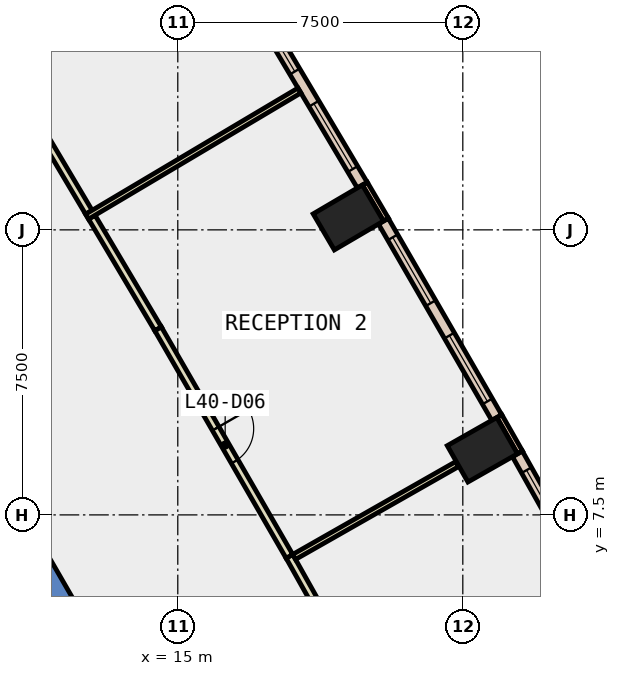
"""IFC4 building model, lengths in metres.
Left out: names, types, materials, properties, quantities, classifications, styles, units other than length and angle.
Written with IfcOpenShell. Run it as: python <this file> out.ifc"""

import sys

from ifc_helpers import new_model, si_unit, direction, frame, frame_2d, origin, origin_2d, place, context, subcontext, project, spatial, polyline, rectangle, outline, extrude, element, fill, save


model = new_model("IFC4")
c1 = context("Model", 3, precision=1e-05, world=origin(), true_north=direction((0.0, 1.0)))
c2 = subcontext(c1, "Body", "Model", "MODEL_VIEW")
j1 = project(units=[si_unit("LENGTHUNIT", "METRE"), si_unit("PLANEANGLEUNIT", "RADIAN")], contexts=[c1])
p1 = place(None, origin())
s1 = spatial("IfcSite", under=j1, at=p1, CompositionType="ELEMENT")
p2 = place(p1, origin())
s2 = spatial("IfcBuilding", under=s1, at=p2, CompositionType="ELEMENT")
p3 = place(p2, frame((0.0, 0.0, 180.2)))
s3 = spatial("IfcBuildingStorey", under=s2, at=p3, CompositionType="ELEMENT", Elevation=180.2)
for number, where, z_axis, x_axis in (
    (1, (23.015, 9.214, -0.4), (0.0, 0.0, 1.0), (-0.494, 0.869, 0.0)),
    (2, (19.488, 15.326, -0.4), (0.0, 0.0, 1.0), (-0.506, 0.863, 0.0)),
):
    element("IfcColumn", number, at=place(p3, frame(where, z_axis=z_axis, x_axis=x_axis)), inside=s3, PredefinedType="COLUMN", context=c2, shape_type="SweptSolid", body=[
        extrude(rectangle(XDim=1.1, YDim=1.5, at=origin_2d()), origin(), (0.0, 0.0, 1.0), 4.0),
    ])
p4 = place(p3, frame((0.0, 0.0, -0.4)))
e3 = element("IfcWall", 3, at=p4, inside=s3, PredefinedType="SHEAR", context=c2, shape_type="SweptSolid", body=[
    extrude(outline(polyline([(8.517, 11.748), (7.651, 11.248), (12.702, 2.5), (13.856, 2.5), (8.517, 11.748)])), origin(), (0.0, 0.0, 1.0), 4.0),
])
p5 = place(p3, frame((24.005, 9.144, 0.0), z_axis=(0.0, 0.0, 1.0), x_axis=(-0.494512685492, 0.869170411305, 0.0)))
e4 = element("IfcWall", 4, at=p5, inside=s3, PredefinedType="STANDARD", context=c2, shape_type="SweptSolid", body=[
    extrude(rectangle(XDim=1.1, YDim=0.15, at=frame_2d((0.55, 0.0))), origin(), (0.0, 0.0, 1.0), 3.6),
])
p6 = place(p3, frame((20.478, 15.269, 0.0), z_axis=(0.0, 0.0, 1.0), x_axis=(-0.50667077411, 0.862139621327, 0.0)))
e5 = element("IfcWall", 5, at=p6, inside=s3, PredefinedType="STANDARD", context=c2, shape_type="SweptSolid", body=[
    extrude(rectangle(XDim=1.1, YDim=0.15, at=frame_2d((0.55, 0.0))), origin(), (0.0, 0.0, 1.0), 3.6),
])
p7 = place(p3, frame((26.857, 3.9, 0.0), z_axis=(0.0, 0.0, 1.0), x_axis=(-0.489305602904, 0.872112393541, 0.0)))
e6 = element("IfcWall", 6, at=p7, inside=s3, PredefinedType="STANDARD", context=c2, shape_type="SweptSolid", body=[
    extrude(rectangle(XDim=5.969, YDim=0.3, at=frame_2d((2.985, 0.0))), origin(), (0.0, 0.0, 1.0), 3.6),
])
p8 = place(p7, frame((0.492, 0.0, 0.9)))
e7 = element("IfcOpeningElement", 7, at=p8, cuts=e6, PredefinedType="OPENING", context=c2, shape_type="SweptSolid", body=[
    extrude(rectangle(XDim=2.0, YDim=2.6, at=frame_2d((1.0, 1.3))), frame((0.0, 0.16, 0.0), z_axis=(0.0, -1.0, 0.0), x_axis=(1.0, 0.0, 0.0)), (0.0, 0.0, 1.0), 0.32),
])
p9 = place(p7, frame((3.477, 0.0, 0.9)))
e8 = element("IfcOpeningElement", 8, at=p9, cuts=e6, PredefinedType="OPENING", context=c2, shape_type="SweptSolid", body=[
    extrude(rectangle(XDim=2.0, YDim=2.6, at=frame_2d((1.0, 1.3))), frame((0.0, 0.16, 0.0), z_axis=(0.0, -1.0, 0.0), x_axis=(1.0, 0.0, 0.0)), (0.0, 0.0, 1.0), 0.32),
])
p10 = place(p3, frame((23.393, 10.06, 0.0), z_axis=(0.0, 0.0, 1.0), x_axis=(-0.499908916093, 0.866077984716, 0.0)))
e9 = element("IfcWall", 9, at=p10, inside=s3, PredefinedType="STANDARD", context=c2, shape_type="SweptSolid", body=[
    extrude(rectangle(XDim=5.969, YDim=0.3, at=frame_2d((2.985, 0.0))), origin(), (0.0, 0.0, 1.0), 3.6),
])
p11 = place(p10, frame((0.492, 0.0, 0.9)))
e10 = element("IfcOpeningElement", 10, at=p11, cuts=e9, PredefinedType="OPENING", context=c2, shape_type="SweptSolid", body=[
    extrude(rectangle(XDim=2.0, YDim=2.6, at=frame_2d((1.0, 1.3))), frame((0.0, 0.16, 0.0), z_axis=(0.0, -1.0, 0.0), x_axis=(1.0, 0.0, 0.0)), (0.0, 0.0, 1.0), 0.32),
])
p12 = place(p10, frame((3.477, 0.0, 0.9)))
e11 = element("IfcOpeningElement", 11, at=p12, cuts=e9, PredefinedType="OPENING", context=c2, shape_type="SweptSolid", body=[
    extrude(rectangle(XDim=2.0, YDim=2.6, at=frame_2d((1.0, 1.3))), frame((0.0, 0.16, 0.0), z_axis=(0.0, -1.0, 0.0), x_axis=(1.0, 0.0, 0.0)), (0.0, 0.0, 1.0), 0.32),
])
p13 = place(p3, frame((19.854, 16.177, 0.0), z_axis=(0.0, 0.0, 1.0), x_axis=(-0.510653096173, 0.859786842984, 0.0)))
e12 = element("IfcWall", 12, at=p13, inside=s3, PredefinedType="STANDARD", context=c2, shape_type="SweptSolid", body=[
    extrude(rectangle(XDim=5.969, YDim=0.3, at=frame_2d((2.984, 0.0))), origin(), (0.0, 0.0, 1.0), 3.6),
])
p14 = place(p13, frame((0.492, 0.0, 0.9)))
e13 = element("IfcOpeningElement", 13, at=p14, cuts=e12, PredefinedType="OPENING", context=c2, shape_type="SweptSolid", body=[
    extrude(rectangle(XDim=2.0, YDim=2.6, at=frame_2d((1.0, 1.3))), frame((0.0, 0.16, 0.0), z_axis=(0.0, -1.0, 0.0), x_axis=(1.0, 0.0, 0.0)), (0.0, 0.0, 1.0), 0.32),
])
p15 = place(p13, frame((3.477, 0.0, 0.9)))
e14 = element("IfcOpeningElement", 14, at=p15, cuts=e12, PredefinedType="OPENING", context=c2, shape_type="SweptSolid", body=[
    extrude(rectangle(XDim=2.0, YDim=2.6, at=frame_2d((1.0, 1.3))), frame((0.0, 0.16, 0.0), z_axis=(0.0, -1.0, 0.0), x_axis=(1.0, 0.0, 0.0)), (0.0, 0.0, 1.0), 0.32),
])
p16 = place(p3, frame((17.938, 6.411, 0.0), z_axis=(0.0, 0.0, 1.0), x_axis=(0.48930419744, -0.872113182086, 0.0)))
e15 = element("IfcWall", 15, at=p16, inside=s3, PredefinedType="PARTITIONING", context=c2, shape_type="SweptSolid", body=[
    extrude(rectangle(XDim=7.063, YDim=0.2, at=frame_2d((3.532, 0.0))), origin(), (0.0, 0.0, 1.0), 3.6),
])
p17 = place(p16, frame((3.032, 0.0, 0.0)))
e16 = element("IfcOpeningElement", 16, at=p17, cuts=e15, PredefinedType="OPENING", context=c2, shape_type="SweptSolid", body=[
    extrude(rectangle(XDim=1.0, YDim=2.1, at=frame_2d((0.5, 1.05))), frame((0.0, 0.11, 0.0), z_axis=(0.0, -1.0, 0.0), x_axis=(1.0, 0.0, 0.0)), (0.0, 0.0, 1.0), 0.22),
])
p18 = place(p3, frame((12.737, 15.334, 0.0), z_axis=(0.0, 0.0, 1.0), x_axis=(0.51050904729, -0.859872381598, 0.0)))
e17 = element("IfcWall", 17, at=p18, inside=s3, PredefinedType="PARTITIONING", context=c2, shape_type="SweptSolid", body=[
    extrude(rectangle(XDim=3.418, YDim=0.2, at=frame_2d((1.709, 0.0))), origin(), (0.0, 0.0, 1.0), 3.6),
])
p19 = place(p3, frame((14.482, 12.395, 0.0), z_axis=(0.0, 0.0, 1.0), x_axis=(0.499953847993, -0.866052048018, 0.0)))
e18 = element("IfcWall", 18, at=p19, inside=s3, PredefinedType="PARTITIONING", context=c2, shape_type="SweptSolid", body=[
    extrude(rectangle(XDim=6.911, YDim=0.2, at=frame_2d((3.456, 0.0))), origin(), (0.0, 0.0, 1.0), 3.6),
])
p20 = place(p19, frame((3.03, 0.0, 0.0)))
e19 = element("IfcOpeningElement", 19, at=p20, cuts=e18, PredefinedType="OPENING", context=c2, shape_type="SweptSolid", body=[
    extrude(rectangle(XDim=1.0, YDim=2.1, at=frame_2d((0.5, 1.05))), frame((0.0, 0.11, 0.0), z_axis=(0.0, -1.0, 0.0), x_axis=(1.0, 0.0, 0.0)), (0.0, 0.0, 1.0), 0.22),
])
p21 = place(p3, frame((10.915, 18.402, 0.0), z_axis=(0.0, 0.0, 1.0), x_axis=(0.510477693133, -0.85989099589, 0.0)))
e20 = element("IfcWall", 20, at=p21, inside=s3, PredefinedType="PARTITIONING", context=c2, shape_type="SweptSolid", body=[
    extrude(rectangle(XDim=3.418, YDim=0.2, at=frame_2d((1.709, 0.0))), origin(), (0.0, 0.0, 1.0), 3.6),
])
p22 = place(p3, frame((18.062, 6.395, 0.0), z_axis=(0.0, 0.0, 1.0), x_axis=(0.869113540562, 0.494612629854, 0.0)))
e21 = element("IfcWall", 21, at=p22, inside=s3, PredefinedType="PARTITIONING", context=c2, shape_type="SweptSolid", body=[
    extrude(rectangle(XDim=4.929, YDim=0.15, at=frame_2d((2.465, 0.0))), origin(), (0.0, 0.0, 1.0), 3.6),
])
p23 = place(p3, frame((12.613, 15.348, 0.0), z_axis=(0.0, 0.0, 1.0), x_axis=(0.85976815765, 0.510684555368, 0.0)))
e22 = element("IfcWall", 22, at=p23, inside=s3, PredefinedType="PARTITIONING", context=c2, shape_type="SweptSolid", body=[
    extrude(rectangle(XDim=6.499, YDim=0.15, at=frame_2d((3.25, 0.0))), origin(), (0.0, 0.0, 1.0), 3.6),
])
p24 = place(p9, origin())
e23 = element("IfcWindow", 23, at=p24, inside=s3, PartitioningType="SINGLE_PANEL", PredefinedType="WINDOW", context=c2, shape_type="SweptSolid", body=[
    extrude(rectangle(XDim=2.0, YDim=2.6, at=frame_2d((1.0, 1.3))), frame((0.0, 0.03, 0.0), z_axis=(0.0, -1.0, 0.0), x_axis=(1.0, 0.0, 0.0)), (0.0, 0.0, 1.0), 0.06),
])
fill(e8, e23)
p25 = place(p11, origin())
e24 = element("IfcWindow", 24, at=p25, inside=s3, PartitioningType="SINGLE_PANEL", PredefinedType="WINDOW", context=c2, shape_type="SweptSolid", body=[
    extrude(rectangle(XDim=2.0, YDim=2.6, at=frame_2d((1.0, 1.3))), frame((0.0, 0.03, 0.0), z_axis=(0.0, -1.0, 0.0), x_axis=(1.0, 0.0, 0.0)), (0.0, 0.0, 1.0), 0.06),
])
fill(e10, e24)
p26 = place(p12, origin())
e25 = element("IfcWindow", 25, at=p26, inside=s3, PartitioningType="SINGLE_PANEL", PredefinedType="WINDOW", context=c2, shape_type="SweptSolid", body=[
    extrude(rectangle(XDim=2.0, YDim=2.6, at=frame_2d((1.0, 1.3))), frame((0.0, 0.03, 0.0), z_axis=(0.0, -1.0, 0.0), x_axis=(1.0, 0.0, 0.0)), (0.0, 0.0, 1.0), 0.06),
])
fill(e11, e25)
p27 = place(p14, origin())
e26 = element("IfcWindow", 26, at=p27, inside=s3, PartitioningType="SINGLE_PANEL", PredefinedType="WINDOW", context=c2, shape_type="SweptSolid", body=[
    extrude(rectangle(XDim=2.0, YDim=2.6, at=frame_2d((1.0, 1.3))), frame((0.0, 0.03, 0.0), z_axis=(0.0, -1.0, 0.0), x_axis=(1.0, 0.0, 0.0)), (0.0, 0.0, 1.0), 0.06),
])
fill(e13, e26)
p28 = place(p15, origin())
e27 = element("IfcWindow", 27, at=p28, inside=s3, PartitioningType="SINGLE_PANEL", PredefinedType="WINDOW", context=c2, shape_type="SweptSolid", body=[
    extrude(rectangle(XDim=2.0, YDim=2.6, at=frame_2d((1.0, 1.3))), frame((0.0, 0.03, 0.0), z_axis=(0.0, -1.0, 0.0), x_axis=(1.0, 0.0, 0.0)), (0.0, 0.0, 1.0), 0.06),
])
fill(e14, e27)
p29 = place(p20, origin())
e28 = element("IfcDoor", 28, at=p29, inside=s3, OperationType="SINGLE_SWING_LEFT", PredefinedType="DOOR", context=c2, shape_type="SweptSolid", body=[
    extrude(rectangle(XDim=1.0, YDim=2.1, at=frame_2d((0.5, 1.05))), frame((0.0, 0.025, 0.0), z_axis=(0.0, -1.0, 0.0), x_axis=(1.0, 0.0, 0.0)), (0.0, 0.0, 1.0), 0.05),
])
fill(e19, e28)
save(model, sys.argv[1])
